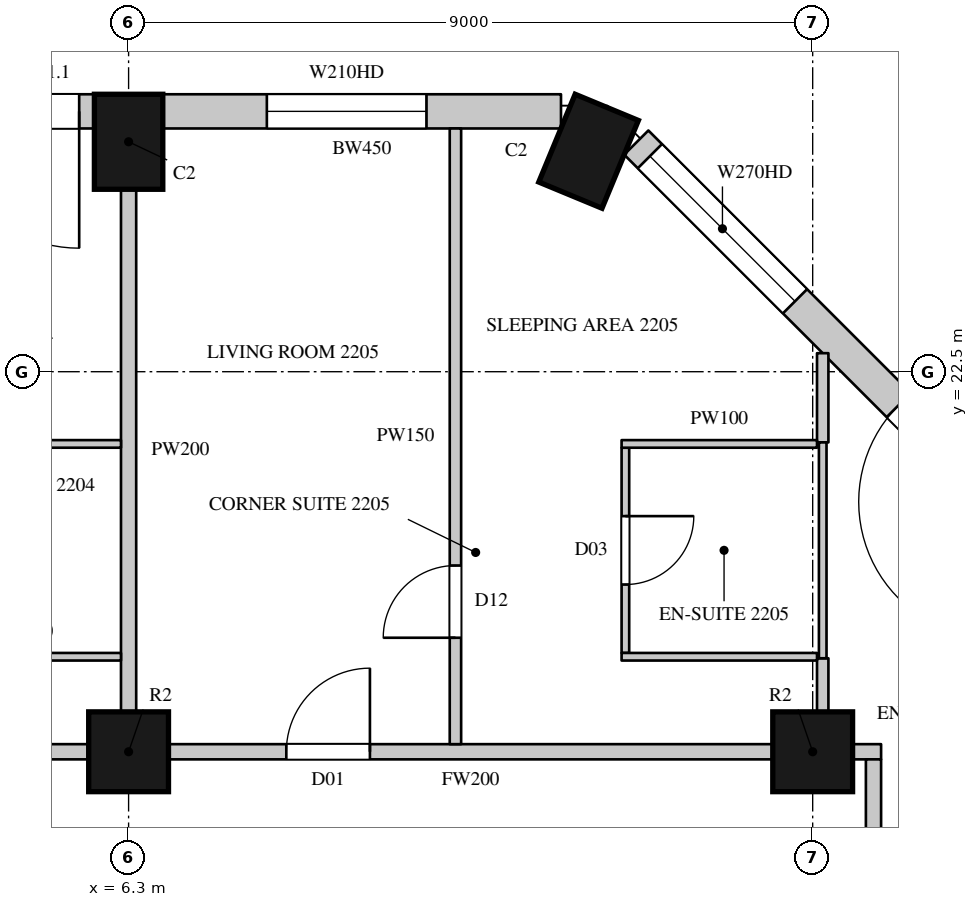
"""IFC4 building model, lengths in metres.
Left out: names, types, materials, properties, quantities, classifications, styles, units other than length and angle.
Written with IfcOpenShell. Run it as: python <this file> out.ifc"""

import sys

from ifc_helpers import new_model, si_unit, direction, frame, frame_2d, origin, origin_2d, place, context, subcontext, project, spatial, rectangle, circle, extrude, element, fill, save


model = new_model("IFC4")
c1 = context("Model", 3, precision=1e-05, world=origin(), true_north=direction((0.0, 1.0)))
c2 = subcontext(c1, "Body", "Model", "MODEL_VIEW")
j1 = project(units=[si_unit("LENGTHUNIT", "METRE"), si_unit("PLANEANGLEUNIT", "RADIAN")], contexts=[c1])
p1 = place(None, origin())
s1 = spatial("IfcSite", under=j1, at=p1, CompositionType="ELEMENT")
p2 = place(p1, origin())
s2 = spatial("IfcBuilding", under=s1, at=p2, CompositionType="ELEMENT")
p3 = place(p2, frame((0.0, 0.0, 109.5)))
s3 = spatial("IfcBuildingStorey", under=s2, at=p3, CompositionType="ELEMENT", Elevation=109.5)
for number, where, z_axis, x_axis in (
    (1, (12.352, 25.4, 0.0), (0.0, 0.0, 1.0), (-0.924, 0.383, 0.0)),
    (2, (6.3, 25.525, 0.0), (0.0, 0.0, 1.0), (-1.0, 0.0, 0.0)),
):
    element("IfcColumn", number, at=place(p3, frame(where, z_axis=z_axis, x_axis=x_axis)), inside=s3, PredefinedType="COLUMN", context=c2, shape_type="SweptSolid", body=[
        extrude(rectangle(XDim=0.9, YDim=1.25, at=origin_2d()), origin(), (0.0, 0.0, 1.0), 3.6),
    ])
for number, where, z_axis, x_axis in (
    (3, (6.3, 17.5, 0.0), (0.0, 0.0, 1.0), (1.0, 0.0, 0.0)),
    (4, (15.3, 17.5, 0.0), (0.0, 0.0, 1.0), (1.0, 0.0, 0.0)),
):
    element("IfcColumn", number, at=place(p3, frame(where, z_axis=z_axis, x_axis=x_axis)), inside=s3, PredefinedType="COLUMN", context=c2, shape_type="SweptSolid", body=[
        extrude(circle(Radius=0.525, at=origin_2d()), origin(), (0.0, 0.0, 1.0), 3.6),
    ])
p4 = place(p3, frame((18.229, 20.265, 0.0), z_axis=(0.0, 0.0, 1.0), x_axis=(-0.707106781187, 0.707106781187, 0.0)))
e5 = element("IfcWall", 5, at=p4, inside=s3, PredefinedType="SOLIDWALL", context=c2, shape_type="SweptSolid", body=[
    extrude(rectangle(XDim=7.424, YDim=0.45, at=frame_2d((3.712, 0.0))), origin(), (0.0, 0.0, 1.0), 3.3),
])
p5 = place(p4, frame((0.74, 0.0, 0.0)))
e6 = element("IfcOpeningElement", 6, at=p5, cuts=e5, PredefinedType="OPENING", context=c2, shape_type="SweptSolid", body=[
    extrude(rectangle(XDim=1.8, YDim=2.4, at=frame_2d((0.9, 1.2))), frame((0.0, 0.235, 0.0), z_axis=(0.0, -1.0, 0.0), x_axis=(1.0, 0.0, 0.0)), (0.0, 0.0, 1.0), 0.47),
])
p6 = place(p4, frame((4.471, 0.0, 1.05)))
e7 = element("IfcOpeningElement", 7, at=p6, cuts=e5, PredefinedType="OPENING", context=c2, shape_type="SweptSolid", body=[
    extrude(rectangle(XDim=2.7, YDim=2.0, at=frame_2d((1.35, 1.0))), frame((0.0, 0.235, 0.0), z_axis=(0.0, -1.0, 0.0), x_axis=(1.0, 0.0, 0.0)), (0.0, 0.0, 1.0), 0.47),
])
p7 = place(p3, frame((11.989, 25.925, 0.0), z_axis=(0.0, 0.0, 1.0), x_axis=(-1.0, 0.0, 0.0)))
e8 = element("IfcWall", 8, at=p7, inside=s3, PredefinedType="SOLIDWALL", context=c2, shape_type="SweptSolid", body=[
    extrude(rectangle(XDim=5.239, YDim=0.45, at=frame_2d((2.619, 0.0))), origin(), (0.0, 0.0, 1.0), 3.3),
])
p8 = place(p7, frame((1.77, 0.0, 1.05)))
e9 = element("IfcOpeningElement", 9, at=p8, cuts=e8, PredefinedType="OPENING", context=c2, shape_type="SweptSolid", body=[
    extrude(rectangle(XDim=2.1, YDim=2.0, at=frame_2d((1.05, 1.0))), frame((0.0, 0.235, 0.0), z_axis=(0.0, -1.0, 0.0), x_axis=(1.0, 0.0, 0.0)), (0.0, 0.0, 1.0), 0.47),
])
p9 = place(p3, frame((5.85, 25.925, 0.0), z_axis=(0.0, 0.0, 1.0), x_axis=(-1.0, 0.0, 0.0)))
e10 = element("IfcWall", 10, at=p9, inside=s3, PredefinedType="SOLIDWALL", context=c2, shape_type="SweptSolid", body=[
    extrude(rectangle(XDim=8.1, YDim=0.45, at=frame_2d((4.05, 0.0))), origin(), (0.0, 0.0, 1.0), 3.3),
])
p10 = place(p9, frame((0.2, 0.0, 0.0)))
e11 = element("IfcOpeningElement", 11, at=p10, cuts=e10, PredefinedType="OPENING", context=c2, shape_type="SweptSolid", body=[
    extrude(rectangle(XDim=1.8, YDim=2.4, at=frame_2d((0.9, 1.2))), frame((0.0, 0.235, 0.0), z_axis=(0.0, -1.0, 0.0), x_axis=(1.0, 0.0, 0.0)), (0.0, 0.0, 1.0), 0.47),
])
p11 = place(p9, frame((2.2, 0.0, 1.05)))
e12 = element("IfcOpeningElement", 12, at=p11, cuts=e10, PredefinedType="OPENING", context=c2, shape_type="SweptSolid", body=[
    extrude(rectangle(XDim=1.2, YDim=2.0, at=frame_2d((0.6, 1.0))), frame((0.0, 0.235, 0.0), z_axis=(0.0, -1.0, 0.0), x_axis=(1.0, 0.0, 0.0)), (0.0, 0.0, 1.0), 0.47),
])
p12 = place(p9, frame((4.7, 0.0, 0.0)))
e13 = element("IfcOpeningElement", 13, at=p12, cuts=e10, PredefinedType="OPENING", context=c2, shape_type="SweptSolid", body=[
    extrude(rectangle(XDim=1.8, YDim=2.4, at=frame_2d((0.9, 1.2))), frame((0.0, 0.235, 0.0), z_axis=(0.0, -1.0, 0.0), x_axis=(1.0, 0.0, 0.0)), (0.0, 0.0, 1.0), 0.47),
])
p13 = place(p9, frame((6.7, 0.0, 1.05)))
e14 = element("IfcOpeningElement", 14, at=p13, cuts=e10, PredefinedType="OPENING", context=c2, shape_type="SweptSolid", body=[
    extrude(rectangle(XDim=1.2, YDim=2.0, at=frame_2d((0.6, 1.0))), frame((0.0, 0.235, 0.0), z_axis=(0.0, -1.0, 0.0), x_axis=(1.0, 0.0, 0.0)), (0.0, 0.0, 1.0), 0.47),
])
p14 = place(p3, frame((16.486, 23.529, 0.0), z_axis=(0.0, 0.0, 1.0), x_axis=(-0.707022305137, 0.707191247145, 0.0)))
e15 = element("IfcWall", 15, at=p14, inside=s3, PredefinedType="SOLIDWALL", context=c2, shape_type="SweptSolid", body=[
    extrude(rectangle(XDim=1.445, YDim=0.45, at=frame_2d((0.723, 0.0))), origin(), (0.0, 0.0, 1.0), 0.6),
])
p15 = place(p3, frame((-2.175, 17.5, 0.0), z_axis=(0.0, 0.0, 1.0), x_axis=(1.0, 0.0, 0.0)))
e16 = element("IfcWall", 16, at=p15, inside=s3, PredefinedType="PARTITIONING", context=c2, shape_type="SweptSolid", body=[
    extrude(rectangle(XDim=7.95, YDim=0.2, at=frame_2d((3.975, 0.0))), origin(), (0.0, 0.0, 1.0), 2.75),
])
p16 = place(p15, frame((1.65, 0.0, 0.0)))
e17 = element("IfcOpeningElement", 17, at=p16, cuts=e16, PredefinedType="OPENING", context=c2, shape_type="SweptSolid", body=[
    extrude(rectangle(XDim=1.1, YDim=2.4, at=frame_2d((0.55, 1.2))), frame((0.0, 0.11, 0.0), z_axis=(0.0, -1.0, 0.0), x_axis=(1.0, 0.0, 0.0)), (0.0, 0.0, 1.0), 0.22),
])
p17 = place(p3, frame((6.825, 17.5, 0.0), z_axis=(0.0, 0.0, 1.0), x_axis=(1.0, 0.0, 0.0)))
e18 = element("IfcWall", 18, at=p17, inside=s3, PredefinedType="PARTITIONING", context=c2, shape_type="SweptSolid", body=[
    extrude(rectangle(XDim=7.95, YDim=0.2, at=frame_2d((3.975, 0.0))), origin(), (0.0, 0.0, 1.0), 2.75),
])
p18 = place(p17, frame((1.55, 0.0, 0.0)))
e19 = element("IfcOpeningElement", 19, at=p18, cuts=e18, PredefinedType="OPENING", context=c2, shape_type="SweptSolid", body=[
    extrude(rectangle(XDim=1.1, YDim=2.4, at=frame_2d((0.55, 1.2))), frame((0.0, 0.11, 0.0), z_axis=(0.0, -1.0, 0.0), x_axis=(1.0, 0.0, 0.0)), (0.0, 0.0, 1.0), 0.22),
])
p19 = place(p3, frame((15.825, 17.5, 0.0), z_axis=(0.0, 0.0, 1.0), x_axis=(1.0, 0.0, 0.0)))
e20 = element("IfcWall", 20, at=p19, inside=s3, PredefinedType="PARTITIONING", context=c2, shape_type="SweptSolid", body=[
    extrude(rectangle(XDim=0.375, YDim=0.2, at=frame_2d((0.188, 0.0))), origin(), (0.0, 0.0, 1.0), 3.3),
])
p20 = place(p3, frame((16.1, 4.75, 0.0), z_axis=(0.0, 0.0, 1.0), x_axis=(0.0, 1.0, 0.0)))
e21 = element("IfcWall", 21, at=p20, inside=s3, PredefinedType="PARTITIONING", context=c2, shape_type="SweptSolid", body=[
    extrude(rectangle(XDim=12.65, YDim=0.2, at=frame_2d((6.325, 0.0))), origin(), (0.0, 0.0, 1.0), 3.3),
])
p21 = place(p20, frame((0.5, 0.0, 0.0)))
e22 = element("IfcOpeningElement", 22, at=p21, cuts=e21, PredefinedType="OPENING", context=c2, shape_type="SweptSolid", body=[
    extrude(rectangle(XDim=0.95, YDim=2.2, at=frame_2d((0.475, 1.1))), frame((0.0, 0.11, 0.0), z_axis=(0.0, -1.0, 0.0), x_axis=(1.0, 0.0, 0.0)), (0.0, 0.0, 1.0), 0.22),
])
p22 = place(p20, frame((6.9, 0.0, 0.0)))
e23 = element("IfcOpeningElement", 23, at=p22, cuts=e21, PredefinedType="OPENING", context=c2, shape_type="SweptSolid", body=[
    extrude(rectangle(XDim=0.95, YDim=2.2, at=frame_2d((0.475, 1.1))), frame((0.0, 0.11, 0.0), z_axis=(0.0, -1.0, 0.0), x_axis=(1.0, 0.0, 0.0)), (0.0, 0.0, 1.0), 0.22),
])
p23 = place(p3, frame((10.6, 17.6, 0.0), z_axis=(0.0, 0.0, 1.0), x_axis=(0.0, 1.0, 0.0)))
e24 = element("IfcWall", 24, at=p23, inside=s3, PredefinedType="PARTITIONING", context=c2, shape_type="SweptSolid", body=[
    extrude(rectangle(XDim=8.1, YDim=0.15, at=frame_2d((4.05, 0.0))), origin(), (0.0, 0.0, 1.0), 3.3),
])
p24 = place(p23, frame((1.4, 0.0, 0.0)))
e25 = element("IfcOpeningElement", 25, at=p24, cuts=e24, PredefinedType="OPENING", context=c2, shape_type="SweptSolid", body=[
    extrude(rectangle(XDim=0.95, YDim=2.2, at=frame_2d((0.475, 1.1))), frame((0.0, 0.085, 0.0), z_axis=(0.0, -1.0, 0.0), x_axis=(1.0, 0.0, 0.0)), (0.0, 0.0, 1.0), 0.17),
])
p25 = place(p3, frame((15.432, 18.016, 0.0), z_axis=(0.0, 0.0, 1.0), x_axis=(0.0, 1.0, 0.0)))
e26 = element("IfcWall", 26, at=p25, inside=s3, PredefinedType="PARTITIONING", context=c2, shape_type="SweptSolid", body=[
    extrude(rectangle(XDim=0.714, YDim=0.15, at=frame_2d((0.357, 0.0))), origin(), (0.0, 0.0, 1.0), 3.3),
])
p26 = place(p3, frame((15.432, 21.57, 0.0), z_axis=(0.0, 0.0, 1.0), x_axis=(0.0, 1.0, 0.0)))
e27 = element("IfcWall", 27, at=p26, inside=s3, PredefinedType="PARTITIONING", context=c2, shape_type="SweptSolid", body=[
    extrude(rectangle(XDim=1.174, YDim=0.15, at=frame_2d((0.587, 0.0))), origin(), (0.0, 0.0, 1.0), 3.3),
])
p27 = place(p3, frame((6.3, 18.025, 0.0), z_axis=(0.0, 0.0, 1.0), x_axis=(0.0, 1.0, 0.0)))
e28 = element("IfcWall", 28, at=p27, inside=s3, PredefinedType="PARTITIONING", context=c2, shape_type="SweptSolid", body=[
    extrude(rectangle(XDim=6.875, YDim=0.2, at=frame_2d((3.438, 0.0))), origin(), (0.0, 0.0, 1.0), 2.75),
])
for number, where, z_axis, x_axis in (
    (29, (3.654, 18.75, 0.0), (0.0, 0.0, 1.0), (1.0, 0.0, 0.0)),
    (30, (3.654, 21.55, 0.0), (0.0, 0.0, 1.0), (1.0, 0.0, 0.0)),
):
    element("IfcWall", number, at=place(p3, frame(where, z_axis=z_axis, x_axis=x_axis)), inside=s3, PredefinedType="PARTITIONING", context=c2, shape_type="SweptSolid", body=[
        extrude(rectangle(XDim=2.546, YDim=0.1, at=frame_2d((1.273, 0.0))), origin(), (0.0, 0.0, 1.0), 3.3),
    ])
p28 = place(p3, frame((12.836, 18.8, 0.0), z_axis=(0.0, 0.0, 1.0), x_axis=(0.0, 1.0, 0.0)))
e31 = element("IfcWall", 31, at=p28, inside=s3, PredefinedType="PARTITIONING", context=c2, shape_type="SweptSolid", body=[
    extrude(rectangle(XDim=2.7, YDim=0.1, at=frame_2d((1.35, 0.0))), origin(), (0.0, 0.0, 1.0), 3.3),
])
p29 = place(p28, frame((0.9, 0.0, 0.0)))
e32 = element("IfcOpeningElement", 32, at=p29, cuts=e31, PredefinedType="OPENING", context=c2, shape_type="SweptSolid", body=[
    extrude(rectangle(XDim=0.9, YDim=2.2, at=frame_2d((0.45, 1.1))), frame((0.0, 0.06, 0.0), z_axis=(0.0, -1.0, 0.0), x_axis=(1.0, 0.0, 0.0)), (0.0, 0.0, 1.0), 0.12),
])
for number, where, z_axis, x_axis in (
    (33, (12.786, 18.75, 0.0), (0.0, 0.0, 1.0), (1.0, 0.0, 0.0)),
    (34, (12.786, 21.55, 0.0), (0.0, 0.0, 1.0), (1.0, 0.0, 0.0)),
):
    element("IfcWall", number, at=place(p3, frame(where, z_axis=z_axis, x_axis=x_axis)), inside=s3, PredefinedType="PARTITIONING", context=c2, shape_type="SweptSolid", body=[
        extrude(rectangle(XDim=2.571, YDim=0.1, at=frame_2d((1.286, 0.0))), origin(), (0.0, 0.0, 1.0), 3.3),
    ])
p30 = place(p3, frame((15.432, 18.73, 0.0), z_axis=(0.0, 0.0, 1.0), x_axis=(0.0, 1.0, 0.0)))
e35 = element("IfcWall", 35, at=p30, inside=s3, PredefinedType="PARTITIONING", context=c2, shape_type="SweptSolid", body=[
    extrude(rectangle(XDim=2.84, YDim=0.1, at=frame_2d((1.42, 0.0))), origin(), (0.0, 0.0, 1.0), 3.3),
])
p31 = place(p5, origin())
e36 = element("IfcDoor", 36, at=p31, inside=s3, OperationType="SLIDING_TO_LEFT", PredefinedType="DOOR", context=c2, shape_type="SweptSolid", body=[
    extrude(rectangle(XDim=1.8, YDim=2.4, at=frame_2d((0.9, 1.2))), frame((0.0, 0.13, 0.0), z_axis=(0.0, -1.0, 0.0), x_axis=(1.0, 0.0, 0.0)), (0.0, 0.0, 1.0), 0.05),
])
fill(e6, e36)
p32 = place(p6, origin())
e37 = element("IfcWindow", 37, at=p32, inside=s3, PartitioningType="SINGLE_PANEL", PredefinedType="WINDOW", context=c2, shape_type="SweptSolid", body=[
    extrude(rectangle(XDim=2.7, YDim=2.0, at=frame_2d((1.35, 1.0))), frame((0.0, 0.135, 0.0), z_axis=(0.0, -1.0, 0.0), x_axis=(1.0, 0.0, 0.0)), (0.0, 0.0, 1.0), 0.06),
])
fill(e7, e37)
p33 = place(p10, origin())
e38 = element("IfcDoor", 38, at=p33, inside=s3, OperationType="SLIDING_TO_LEFT", PredefinedType="DOOR", context=c2, shape_type="SweptSolid", body=[
    extrude(rectangle(XDim=1.8, YDim=2.4, at=frame_2d((0.9, 1.2))), frame((0.0, 0.13, 0.0), z_axis=(0.0, -1.0, 0.0), x_axis=(1.0, 0.0, 0.0)), (0.0, 0.0, 1.0), 0.05),
])
fill(e11, e38)
p34 = place(p18, origin())
e39 = element("IfcDoor", 39, at=p34, inside=s3, OperationType="SINGLE_SWING_RIGHT", PredefinedType="DOOR", context=c2, shape_type="SweptSolid", body=[
    extrude(rectangle(XDim=1.1, YDim=2.4, at=frame_2d((0.55, 1.2))), frame((0.0, 0.025, 0.0), z_axis=(0.0, -1.0, 0.0), x_axis=(1.0, 0.0, 0.0)), (0.0, 0.0, 1.0), 0.05),
])
fill(e19, e39)
p35 = place(p24, origin())
e40 = element("IfcDoor", 40, at=p35, inside=s3, OperationType="SINGLE_SWING_LEFT", PredefinedType="DOOR", context=c2, shape_type="SweptSolid", body=[
    extrude(rectangle(XDim=0.95, YDim=2.2, at=frame_2d((0.475, 1.1))), frame((0.0, 0.025, 0.0), z_axis=(0.0, -1.0, 0.0), x_axis=(1.0, 0.0, 0.0)), (0.0, 0.0, 1.0), 0.05),
])
fill(e25, e40)
p36 = place(p29, origin())
e41 = element("IfcDoor", 41, at=p36, inside=s3, OperationType="SINGLE_SWING_LEFT", PredefinedType="DOOR", context=c2, shape_type="SweptSolid", body=[
    extrude(rectangle(XDim=0.9, YDim=2.2, at=frame_2d((0.45, 1.1))), frame((0.0, 0.025, 0.0), z_axis=(0.0, -1.0, 0.0), x_axis=(1.0, 0.0, 0.0)), (0.0, 0.0, 1.0), 0.05),
])
fill(e32, e41)
p37 = place(p8, origin())
e42 = element("IfcWindow", 42, at=p37, inside=s3, PartitioningType="SINGLE_PANEL", PredefinedType="WINDOW", context=c2, shape_type="SweptSolid", body=[
    extrude(rectangle(XDim=2.1, YDim=2.0, at=frame_2d((1.05, 1.0))), frame((0.0, 0.135, 0.0), z_axis=(0.0, -1.0, 0.0), x_axis=(1.0, 0.0, 0.0)), (0.0, 0.0, 1.0), 0.06),
])
fill(e9, e42)
save(model, sys.argv[1])
